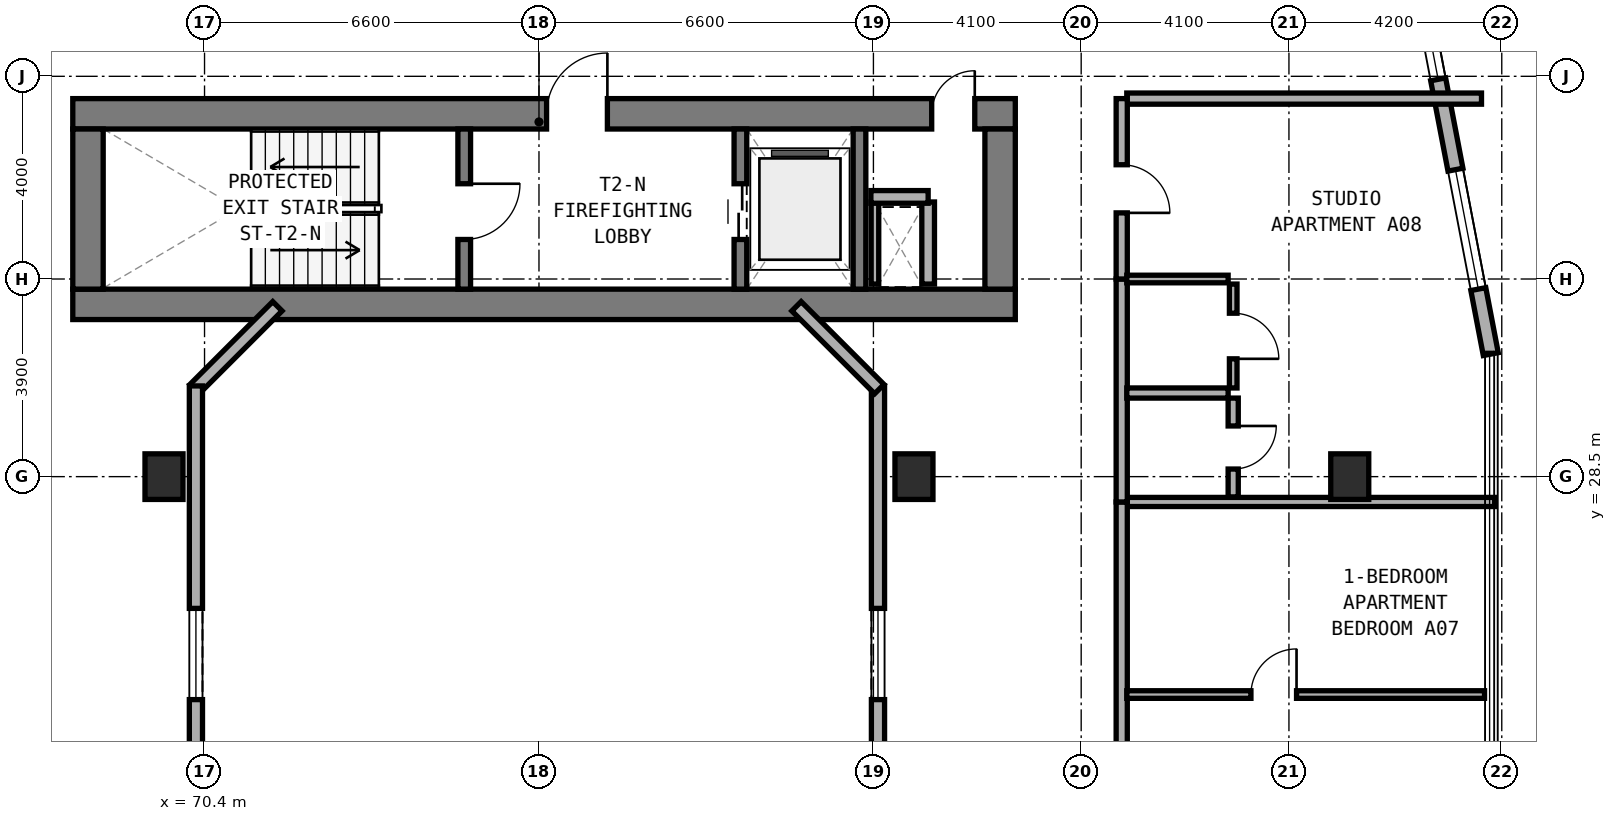
"""IFC4 building model, lengths in metres.
Left out: names, types, materials, properties, quantities, classifications, styles, units other than length and angle.
Written with IfcOpenShell. Run it as: python <this file> out.ifc"""

import sys

from ifc_helpers import new_model, si_unit, direction, frame, frame_2d, origin, origin_2d, place, context, subcontext, project, spatial, rectangle, extrude, element, fill, save


model = new_model("IFC4")
c1 = context("Model", 3, precision=1e-05, world=origin(), true_north=direction((0.0, 1.0)))
c2 = subcontext(c1, "Body", "Model", "MODEL_VIEW")
j1 = project(units=[si_unit("LENGTHUNIT", "METRE"), si_unit("PLANEANGLEUNIT", "RADIAN")], contexts=[c1])
p1 = place(None, origin())
s1 = spatial("IfcSite", under=j1, at=p1, CompositionType="ELEMENT")
p2 = place(p1, origin())
s2 = spatial("IfcBuilding", under=s1, at=p2, CompositionType="ELEMENT")
p3 = place(p2, frame((0.0, 0.0, 45.0)))
s3 = spatial("IfcBuildingStorey", under=s2, at=p3, CompositionType="ELEMENT", Elevation=45.0)
p4 = place(p3, frame((67.8, 31.9, 0.0), z_axis=(0.0, 0.0, 1.0), x_axis=(1.0, 0.0, 0.0)))
e1 = element("IfcWall", 1, at=p4, inside=s3, PredefinedType="SHEAR", context=c2, shape_type="SweptSolid", body=[
    extrude(rectangle(XDim=18.6, YDim=0.6, at=frame_2d((9.3, 0.0))), origin(), (0.0, 0.0, 1.0), 3.5),
])
p5 = place(p3, frame((67.8, 35.66, 0.0), z_axis=(0.0, 0.0, 1.0), x_axis=(1.0, 0.0, 0.0)))
e2 = element("IfcWall", 2, at=p5, inside=s3, PredefinedType="SHEAR", context=c2, shape_type="SweptSolid", body=[
    extrude(rectangle(XDim=18.6, YDim=0.6, at=frame_2d((9.3, 0.0))), origin(), (0.0, 0.0, 1.0), 3.5),
])
p6 = place(p5, frame((9.35, 0.0, 0.0)))
e3 = element("IfcOpeningElement", 3, at=p6, cuts=e2, PredefinedType="OPENING", context=c2, shape_type="SweptSolid", body=[
    extrude(rectangle(XDim=1.2, YDim=2.15, at=frame_2d((0.6, 1.075))), frame((0.0, 0.31, 0.0), z_axis=(0.0, -1.0, 0.0), x_axis=(1.0, 0.0, 0.0)), (0.0, 0.0, 1.0), 0.62),
])
p7 = place(p5, frame((16.95, 0.0, 0.0)))
e4 = element("IfcOpeningElement", 4, at=p7, cuts=e2, PredefinedType="OPENING", context=c2, shape_type="SweptSolid", body=[
    extrude(rectangle(XDim=0.85, YDim=2.1, at=frame_2d((0.425, 1.05))), frame((0.0, 0.31, 0.0), z_axis=(0.0, -1.0, 0.0), x_axis=(1.0, 0.0, 0.0)), (0.0, 0.0, 1.0), 0.62),
])
for number, where, z_axis, x_axis in (
    (5, (68.1, 32.2, 0.0), (0.0, 0.0, 1.0), (0.0, 1.0, 0.0)),
    (6, (86.1, 32.2, 0.0), (0.0, 0.0, 1.0), (0.0, 1.0, 0.0)),
):
    element("IfcWall", number, at=place(p3, frame(where, z_axis=z_axis, x_axis=x_axis)), inside=s3, PredefinedType="SHEAR", context=c2, shape_type="SweptSolid", body=[
        extrude(rectangle(XDim=3.16, YDim=0.6, at=frame_2d((1.58, 0.0))), origin(), (0.0, 0.0, 1.0), 3.5),
    ])
p8 = place(p3, frame((75.525, 32.2, 0.0), z_axis=(0.0, 0.0, 1.0), x_axis=(0.0, 1.0, 0.0)))
e7 = element("IfcWall", 7, at=p8, inside=s3, PredefinedType="STANDARD", context=c2, shape_type="SweptSolid", body=[
    extrude(rectangle(XDim=3.16, YDim=0.25, at=frame_2d((1.58, 0.0))), origin(), (0.0, 0.0, 1.0), 3.25),
])
p9 = place(p8, frame((0.98, 0.0, 0.0)))
e8 = element("IfcOpeningElement", 8, at=p9, cuts=e7, PredefinedType="OPENING", context=c2, shape_type="SweptSolid", body=[
    extrude(rectangle(XDim=1.1, YDim=2.15, at=frame_2d((0.55, 1.075))), frame((0.0, 0.135, 0.0), z_axis=(0.0, -1.0, 0.0), x_axis=(1.0, 0.0, 0.0)), (0.0, 0.0, 1.0), 0.27),
])
p10 = place(p3, frame((80.975, 32.2, 0.0), z_axis=(0.0, 0.0, 1.0), x_axis=(0.0, 1.0, 0.0)))
e9 = element("IfcWall", 9, at=p10, inside=s3, PredefinedType="STANDARD", context=c2, shape_type="SweptSolid", body=[
    extrude(rectangle(XDim=3.16, YDim=0.25, at=frame_2d((1.58, 0.0))), origin(), (0.0, 0.0, 1.0), 3.25),
])
p11 = place(p10, frame((0.98, 0.0, 0.0)))
e10 = element("IfcOpeningElement", 10, at=p11, cuts=e9, PredefinedType="OPENING", context=c2, shape_type="SweptSolid", body=[
    extrude(rectangle(XDim=1.1, YDim=2.15, at=frame_2d((0.55, 1.075))), frame((0.0, 0.135, 0.0), z_axis=(0.0, -1.0, 0.0), x_axis=(1.0, 0.0, 0.0)), (0.0, 0.0, 1.0), 0.27),
])
p12 = place(p3, frame((83.325, 32.2, 0.0), z_axis=(0.0, 0.0, 1.0), x_axis=(0.0, 1.0, 0.0)))
e11 = element("IfcWall", 11, at=p12, inside=s3, PredefinedType="STANDARD", context=c2, shape_type="SweptSolid", body=[
    extrude(rectangle(XDim=3.16, YDim=0.25, at=frame_2d((1.58, 0.0))), origin(), (0.0, 0.0, 1.0), 3.25),
])
for number, where, z_axis, x_axis in (
    (12, (93.0, 28.5, 0.0), (0.0, 0.0, 1.0), (1.0, 0.0, 0.0)),
    (13, (69.6, 28.5, 0.0), (0.0, 0.0, 1.0), (1.0, 0.0, 0.0)),
    (14, (84.4, 28.5, 0.0), (0.0, 0.0, 1.0), (1.0, 0.0, 0.0)),
):
    element("IfcColumn", number, at=place(p3, frame(where, z_axis=z_axis, x_axis=x_axis)), inside=s3, PredefinedType="COLUMN", context=c2, shape_type="SweptSolid", body=[
        extrude(rectangle(XDim=0.75, YDim=0.9, at=origin_2d()), origin(), (0.0, 0.0, 1.0), 3.5),
    ])
p13 = place(p3, frame((95.783, 30.918, 0.0), z_axis=(0.0, 0.0, 1.0), x_axis=(-0.188087874316, 0.982152203854, 0.0)))
e15 = element("IfcWall", 15, at=p13, inside=s3, PredefinedType="STANDARD", context=c2, shape_type="SweptSolid", body=[
    extrude(rectangle(XDim=9.634, YDim=0.3, at=frame_2d((4.817, 0.0))), origin(), (0.0, 0.0, 1.0), 3.25),
])
p14 = place(p13, frame((1.306, 0.0, 0.8)))
e16 = element("IfcOpeningElement", 16, at=p14, cuts=e15, PredefinedType="OPENING", context=c2, shape_type="SweptSolid", body=[
    extrude(rectangle(XDim=2.4, YDim=1.6, at=frame_2d((1.2, 0.8))), frame((0.0, 0.16, 0.0), z_axis=(0.0, -1.0, 0.0), x_axis=(1.0, 0.0, 0.0)), (0.0, 0.0, 1.0), 0.32),
])
p15 = place(p13, frame((5.521, 0.0, 0.85)))
e17 = element("IfcOpeningElement", 17, at=p15, cuts=e15, PredefinedType="OPENING", context=c2, shape_type="SweptSolid", body=[
    extrude(rectangle(XDim=1.2, YDim=1.5, at=frame_2d((0.6, 0.75))), frame((0.0, 0.16, 0.0), z_axis=(0.0, -1.0, 0.0), x_axis=(1.0, 0.0, 0.0)), (0.0, 0.0, 1.0), 0.32),
])
p16 = place(p13, frame((7.682, 0.0, 0.85)))
e18 = element("IfcOpeningElement", 18, at=p16, cuts=e15, PredefinedType="OPENING", context=c2, shape_type="SweptSolid", body=[
    extrude(rectangle(XDim=1.5, YDim=1.5, at=frame_2d((0.75, 0.75))), frame((0.0, 0.16, 0.0), z_axis=(0.0, -1.0, 0.0), x_axis=(1.0, 0.0, 0.0)), (0.0, 0.0, 1.0), 0.32),
])
p17 = place(p3, frame((83.69, 19.71, 0.0), z_axis=(0.0, 0.0, 1.0), x_axis=(0.0, 1.0, 0.0)))
e19 = element("IfcWall", 19, at=p17, inside=s3, PredefinedType="STANDARD", context=c2, shape_type="SweptSolid", body=[
    extrude(rectangle(XDim=10.58, YDim=0.26, at=frame_2d((5.29, 0.0))), origin(), (0.0, 0.0, 1.0), 3.25),
])
p18 = place(p17, frame((4.39, 0.0, 0.85)))
e20 = element("IfcOpeningElement", 20, at=p18, cuts=e19, PredefinedType="OPENING", context=c2, shape_type="SweptSolid", body=[
    extrude(rectangle(XDim=1.8, YDim=1.5, at=frame_2d((0.9, 0.75))), frame((0.0, 0.14, 0.0), z_axis=(0.0, -1.0, 0.0), x_axis=(1.0, 0.0, 0.0)), (0.0, 0.0, 1.0), 0.28),
])
for number, where, z_axis, x_axis in (
    (21, (83.716, 30.228, 0.0), (0.0, 0.0, 1.0), (-0.707, 0.707, 0.0)),
    (22, (71.838, 31.862, 0.0), (0.0, 0.0, 1.0), (-0.707, -0.707, 0.0)),
):
    element("IfcWall", number, at=place(p3, frame(where, z_axis=z_axis, x_axis=x_axis)), inside=s3, PredefinedType="STANDARD", context=c2, shape_type="SweptSolid", body=[
        extrude(rectangle(XDim=2.311, YDim=0.26, at=frame_2d((1.155, 0.0))), origin(), (0.0, 0.0, 1.0), 3.25),
    ])
p19 = place(p3, frame((70.23, 30.29, 0.0), z_axis=(0.0, 0.0, 1.0), x_axis=(0.0, -1.0, 0.0)))
e23 = element("IfcWall", 23, at=p19, inside=s3, PredefinedType="STANDARD", context=c2, shape_type="SweptSolid", body=[
    extrude(rectangle(XDim=10.58, YDim=0.26, at=frame_2d((5.29, 0.0))), origin(), (0.0, 0.0, 1.0), 3.25),
])
p20 = place(p19, frame((4.39, 0.0, 0.85)))
e24 = element("IfcOpeningElement", 24, at=p20, cuts=e23, PredefinedType="OPENING", context=c2, shape_type="SweptSolid", body=[
    extrude(rectangle(XDim=1.8, YDim=1.5, at=frame_2d((0.9, 0.75))), frame((0.0, 0.14, 0.0), z_axis=(0.0, -1.0, 0.0), x_axis=(1.0, 0.0, 0.0)), (0.0, 0.0, 1.0), 0.28),
])
p21 = place(p3, frame((83.63, 32.3, 0.0), z_axis=(0.0, 0.0, 1.0), x_axis=(0.0, 1.0, 0.0)))
e25 = element("IfcWall", 25, at=p21, inside=s3, PredefinedType="PARTITIONING", context=c2, shape_type="SweptSolid", body=[
    extrude(rectangle(XDim=1.62, YDim=0.15, at=frame_2d((0.81, 0.0))), origin(), (0.0, 0.0, 1.0), 2.725),
])
p22 = place(p3, frame((84.68, 32.3, 0.0), z_axis=(0.0, 0.0, 1.0), x_axis=(0.0, 1.0, 0.0)))
e26 = element("IfcWall", 26, at=p22, inside=s3, PredefinedType="SOLIDWALL", context=c2, shape_type="SweptSolid", body=[
    extrude(rectangle(XDim=1.62, YDim=0.25, at=frame_2d((0.81, 0.0))), origin(), (0.0, 0.0, 1.0), 3.22),
])
p23 = place(p3, frame((83.55, 34.02, 0.0), z_axis=(0.0, 0.0, 1.0), x_axis=(1.0, 0.0, 0.0)))
e27 = element("IfcWall", 27, at=p23, inside=s3, PredefinedType="SOLIDWALL", context=c2, shape_type="SweptSolid", body=[
    extrude(rectangle(XDim=1.13, YDim=0.25, at=frame_2d((0.565, 0.0))), origin(), (0.0, 0.0, 1.0), 3.22),
])
p24 = place(p3, frame((88.6, 35.96, 0.0), z_axis=(0.0, 0.0, 1.0), x_axis=(1.0, 0.0, 0.0)))
e28 = element("IfcWall", 28, at=p24, inside=s3, PredefinedType="SOLIDWALL", context=c2, shape_type="SweptSolid", body=[
    extrude(rectangle(XDim=7.0, YDim=0.22, at=frame_2d((3.5, 0.0))), origin(), (0.0, 0.0, 1.0), 2.865),
])
p25 = place(p3, frame((88.5, 28.0, 0.0), z_axis=(0.0, 0.0, 1.0), x_axis=(1.0, 0.0, 0.0)))
e29 = element("IfcWall", 29, at=p25, inside=s3, PredefinedType="SOLIDWALL", context=c2, shape_type="SweptSolid", body=[
    extrude(rectangle(XDim=7.36, YDim=0.18, at=frame_2d((3.68, 0.0))), origin(), (0.0, 0.0, 1.0), 2.865),
])
p26 = place(p3, frame((88.5, 18.44, 0.0), z_axis=(0.0, 0.0, 1.0), x_axis=(0.0, 1.0, 0.0)))
e30 = element("IfcWall", 30, at=p26, inside=s3, PredefinedType="SOLIDWALL", context=c2, shape_type="SweptSolid", body=[
    extrude(rectangle(XDim=9.56, YDim=0.22, at=frame_2d((4.78, 0.0))), origin(), (0.0, 0.0, 1.0), 2.725),
])
p27 = place(p26, frame((2.405, 0.0, 0.0)))
e31 = element("IfcOpeningElement", 31, at=p27, cuts=e30, PredefinedType="OPENING", context=c2, shape_type="SweptSolid", body=[
    extrude(rectangle(XDim=0.95, YDim=2.1, at=frame_2d((0.475, 1.05))), frame((0.0, 0.12, 0.0), z_axis=(0.0, -1.0, 0.0), x_axis=(1.0, 0.0, 0.0)), (0.0, 0.0, 1.0), 0.24),
])
p28 = place(p3, frame((88.6, 24.2, 0.0), z_axis=(0.0, 0.0, 1.0), x_axis=(1.0, 0.0, 0.0)))
e32 = element("IfcWall", 32, at=p28, inside=s3, PredefinedType="PARTITIONING", context=c2, shape_type="SweptSolid", body=[
    extrude(rectangle(XDim=7.06, YDim=0.15, at=frame_2d((3.53, 0.0))), origin(), (0.0, 0.0, 1.0), 2.865),
])
p29 = place(p28, frame((2.45, 0.0, 0.0)))
e33 = element("IfcOpeningElement", 33, at=p29, cuts=e32, PredefinedType="OPENING", context=c2, shape_type="SweptSolid", body=[
    extrude(rectangle(XDim=0.9, YDim=2.1, at=frame_2d((0.45, 1.05))), frame((0.0, 0.085, 0.0), z_axis=(0.0, -1.0, 0.0), x_axis=(1.0, 0.0, 0.0)), (0.0, 0.0, 1.0), 0.17),
])
p30 = place(p3, frame((88.5, 28.0, 0.0), z_axis=(0.0, 0.0, 1.0), x_axis=(0.0, 1.0, 0.0)))
e34 = element("IfcWall", 34, at=p30, inside=s3, PredefinedType="SOLIDWALL", context=c2, shape_type="SweptSolid", body=[
    extrude(rectangle(XDim=4.4, YDim=0.22, at=frame_2d((2.2, 0.0))), origin(), (0.0, 0.0, 1.0), 2.725),
])
p31 = place(p3, frame((88.5, 32.4, 0.0), z_axis=(0.0, 0.0, 1.0), x_axis=(0.0, 1.0, 0.0)))
e35 = element("IfcWall", 35, at=p31, inside=s3, PredefinedType="SOLIDWALL", context=c2, shape_type="SweptSolid", body=[
    extrude(rectangle(XDim=3.56, YDim=0.22, at=frame_2d((1.78, 0.0))), origin(), (0.0, 0.0, 1.0), 3.22),
])
p32 = place(p31, frame((1.305, 0.0, 0.0)))
e36 = element("IfcOpeningElement", 36, at=p32, cuts=e35, PredefinedType="OPENING", context=c2, shape_type="SweptSolid", body=[
    extrude(rectangle(XDim=0.95, YDim=2.1, at=frame_2d((0.475, 1.05))), frame((0.0, 0.12, 0.0), z_axis=(0.0, -1.0, 0.0), x_axis=(1.0, 0.0, 0.0)), (0.0, 0.0, 1.0), 0.24),
])
p33 = place(p3, frame((88.6, 30.15, 0.0), z_axis=(0.0, 0.0, 1.0), x_axis=(1.0, 0.0, 0.0)))
e37 = element("IfcWall", 37, at=p33, inside=s3, PredefinedType="PLUMBINGWALL", context=c2, shape_type="SweptSolid", body=[
    extrude(rectangle(XDim=2.0, YDim=0.2, at=frame_2d((1.0, 0.0))), origin(), (0.0, 0.0, 1.0), 3.22),
])
p34 = place(p3, frame((88.6, 32.4, 0.0), z_axis=(0.0, 0.0, 1.0), x_axis=(1.0, 0.0, 0.0)))
e38 = element("IfcWall", 38, at=p34, inside=s3, PredefinedType="PARTITIONING", context=c2, shape_type="SweptSolid", body=[
    extrude(rectangle(XDim=2.0, YDim=0.15, at=frame_2d((1.0, 0.0))), origin(), (0.0, 0.0, 1.0), 3.22),
])
p35 = place(p3, frame((90.7, 28.1, 0.0), z_axis=(0.0, 0.0, 1.0), x_axis=(0.0, 1.0, 0.0)))
e39 = element("IfcWall", 39, at=p35, inside=s3, PredefinedType="PLUMBINGWALL", context=c2, shape_type="SweptSolid", body=[
    extrude(rectangle(XDim=1.95, YDim=0.2, at=frame_2d((0.975, 0.0))), origin(), (0.0, 0.0, 1.0), 2.725),
])
p36 = place(p35, frame((0.55, 0.0, 0.0)))
e40 = element("IfcOpeningElement", 40, at=p36, cuts=e39, PredefinedType="OPENING", context=c2, shape_type="SweptSolid", body=[
    extrude(rectangle(XDim=0.85, YDim=2.1, at=frame_2d((0.425, 1.05))), frame((0.0, 0.11, 0.0), z_axis=(0.0, -1.0, 0.0), x_axis=(1.0, 0.0, 0.0)), (0.0, 0.0, 1.0), 0.22),
])
p37 = place(p3, frame((90.7, 30.25, 0.0), z_axis=(0.0, 0.0, 1.0), x_axis=(0.0, 1.0, 0.0)))
e41 = element("IfcWall", 41, at=p37, inside=s3, PredefinedType="PARTITIONING", context=c2, shape_type="SweptSolid", body=[
    extrude(rectangle(XDim=2.05, YDim=0.15, at=frame_2d((1.025, 0.0))), origin(), (0.0, 0.0, 1.0), 3.22),
])
p38 = place(p37, frame((0.575, 0.0, 0.0)))
e42 = element("IfcOpeningElement", 42, at=p38, cuts=e41, PredefinedType="OPENING", context=c2, shape_type="SweptSolid", body=[
    extrude(rectangle(XDim=0.9, YDim=2.1, at=frame_2d((0.45, 1.05))), frame((0.0, 0.085, 0.0), z_axis=(0.0, -1.0, 0.0), x_axis=(1.0, 0.0, 0.0)), (0.0, 0.0, 1.0), 0.17),
])
p39 = place(p14, origin())
e43 = element("IfcWindow", 43, at=p39, inside=s3, PartitioningType="SINGLE_PANEL", PredefinedType="WINDOW", context=c2, shape_type="SweptSolid", body=[
    extrude(rectangle(XDim=2.4, YDim=1.6, at=frame_2d((1.2, 0.8))), frame((0.0, 0.03, 0.0), z_axis=(0.0, -1.0, 0.0), x_axis=(1.0, 0.0, 0.0)), (0.0, 0.0, 1.0), 0.06),
])
fill(e16, e43)
p40 = place(p15, origin())
e44 = element("IfcWindow", 44, at=p40, inside=s3, PartitioningType="SINGLE_PANEL", PredefinedType="WINDOW", context=c2, shape_type="SweptSolid", body=[
    extrude(rectangle(XDim=1.2, YDim=1.5, at=frame_2d((0.6, 0.75))), frame((0.0, 0.03, 0.0), z_axis=(0.0, -1.0, 0.0), x_axis=(1.0, 0.0, 0.0)), (0.0, 0.0, 1.0), 0.06),
])
fill(e17, e44)
p41 = place(p18, origin())
e45 = element("IfcWindow", 45, at=p41, inside=s3, PartitioningType="SINGLE_PANEL", PredefinedType="WINDOW", context=c2, shape_type="SweptSolid", body=[
    extrude(rectangle(XDim=1.8, YDim=1.5, at=frame_2d((0.9, 0.75))), frame((0.0, 0.03, 0.0), z_axis=(0.0, -1.0, 0.0), x_axis=(1.0, 0.0, 0.0)), (0.0, 0.0, 1.0), 0.06),
])
fill(e20, e45)
p42 = place(p20, origin())
e46 = element("IfcWindow", 46, at=p42, inside=s3, PartitioningType="SINGLE_PANEL", PredefinedType="WINDOW", context=c2, shape_type="SweptSolid", body=[
    extrude(rectangle(XDim=1.8, YDim=1.5, at=frame_2d((0.9, 0.75))), frame((0.0, 0.03, 0.0), z_axis=(0.0, -1.0, 0.0), x_axis=(1.0, 0.0, 0.0)), (0.0, 0.0, 1.0), 0.06),
])
fill(e24, e46)
p43 = place(p9, frame((1.1, 0.0, 0.0), z_axis=(0.0, 0.0, 1.0), x_axis=(-1.0, 0.0, 0.0)))
e47 = element("IfcDoor", 47, at=p43, inside=s3, OperationType="SINGLE_SWING_LEFT", PredefinedType="DOOR", context=c2, shape_type="SweptSolid", body=[
    extrude(rectangle(XDim=1.1, YDim=2.15, at=frame_2d((0.55, 1.075))), frame((0.0, 0.025, 0.0), z_axis=(0.0, -1.0, 0.0), x_axis=(1.0, 0.0, 0.0)), (0.0, 0.0, 1.0), 0.05),
])
fill(e8, e47)
p44 = place(p6, origin())
e48 = element("IfcDoor", 48, at=p44, inside=s3, OperationType="SINGLE_SWING_RIGHT", PredefinedType="DOOR", context=c2, shape_type="SweptSolid", body=[
    extrude(rectangle(XDim=1.2, YDim=2.15, at=frame_2d((0.6, 1.075))), frame((0.0, 0.025, 0.0), z_axis=(0.0, -1.0, 0.0), x_axis=(1.0, 0.0, 0.0)), (0.0, 0.0, 1.0), 0.05),
])
fill(e3, e48)
p45 = place(p11, origin())
e49 = element("IfcDoor", 49, at=p45, inside=s3, OperationType="DOUBLE_DOOR_SLIDING", PredefinedType="DOOR", context=c2, shape_type="SweptSolid", body=[
    extrude(rectangle(XDim=1.1, YDim=2.15, at=frame_2d((0.55, 1.075))), frame((0.0, 0.025, 0.0), z_axis=(0.0, -1.0, 0.0), x_axis=(1.0, 0.0, 0.0)), (0.0, 0.0, 1.0), 0.05),
])
fill(e10, e49)
p46 = place(p7, origin())
e50 = element("IfcDoor", 50, at=p46, inside=s3, OperationType="SINGLE_SWING_RIGHT", PredefinedType="DOOR", context=c2, shape_type="SweptSolid", body=[
    extrude(rectangle(XDim=0.85, YDim=2.1, at=frame_2d((0.425, 1.05))), frame((0.0, 0.025, 0.0), z_axis=(0.0, -1.0, 0.0), x_axis=(1.0, 0.0, 0.0)), (0.0, 0.0, 1.0), 0.05),
])
fill(e4, e50)
p47 = place(p29, origin())
e51 = element("IfcDoor", 51, at=p47, inside=s3, OperationType="SINGLE_SWING_RIGHT", PredefinedType="DOOR", context=c2, shape_type="SweptSolid", body=[
    extrude(rectangle(XDim=0.9, YDim=2.1, at=frame_2d((0.45, 1.05))), frame((0.0, 0.025, 0.0), z_axis=(0.0, -1.0, 0.0), x_axis=(1.0, 0.0, 0.0)), (0.0, 0.0, 1.0), 0.05),
])
fill(e33, e51)
p48 = place(p32, frame((0.95, 0.0, 0.0), z_axis=(0.0, 0.0, 1.0), x_axis=(-1.0, 0.0, 0.0)))
e52 = element("IfcDoor", 52, at=p48, inside=s3, OperationType="SINGLE_SWING_RIGHT", PredefinedType="DOOR", context=c2, shape_type="SweptSolid", body=[
    extrude(rectangle(XDim=0.95, YDim=2.1, at=frame_2d((0.475, 1.05))), frame((0.0, 0.025, 0.0), z_axis=(0.0, -1.0, 0.0), x_axis=(1.0, 0.0, 0.0)), (0.0, 0.0, 1.0), 0.05),
])
fill(e36, e52)
p49 = place(p36, frame((0.85, 0.0, 0.0), z_axis=(0.0, 0.0, 1.0), x_axis=(-1.0, 0.0, 0.0)))
e53 = element("IfcDoor", 53, at=p49, inside=s3, OperationType="SINGLE_SWING_LEFT", PredefinedType="DOOR", context=c2, shape_type="SweptSolid", body=[
    extrude(rectangle(XDim=0.85, YDim=2.1, at=frame_2d((0.425, 1.05))), frame((0.0, 0.025, 0.0), z_axis=(0.0, -1.0, 0.0), x_axis=(1.0, 0.0, 0.0)), (0.0, 0.0, 1.0), 0.05),
])
fill(e40, e53)
p50 = place(p38, frame((0.9, 0.0, 0.0), z_axis=(0.0, 0.0, 1.0), x_axis=(-1.0, 0.0, 0.0)))
e54 = element("IfcDoor", 54, at=p50, inside=s3, OperationType="SINGLE_SWING_RIGHT", PredefinedType="DOOR", context=c2, shape_type="SweptSolid", body=[
    extrude(rectangle(XDim=0.9, YDim=2.1, at=frame_2d((0.45, 1.05))), frame((0.0, 0.025, 0.0), z_axis=(0.0, -1.0, 0.0), x_axis=(1.0, 0.0, 0.0)), (0.0, 0.0, 1.0), 0.05),
])
fill(e42, e54)
save(model, sys.argv[1])
